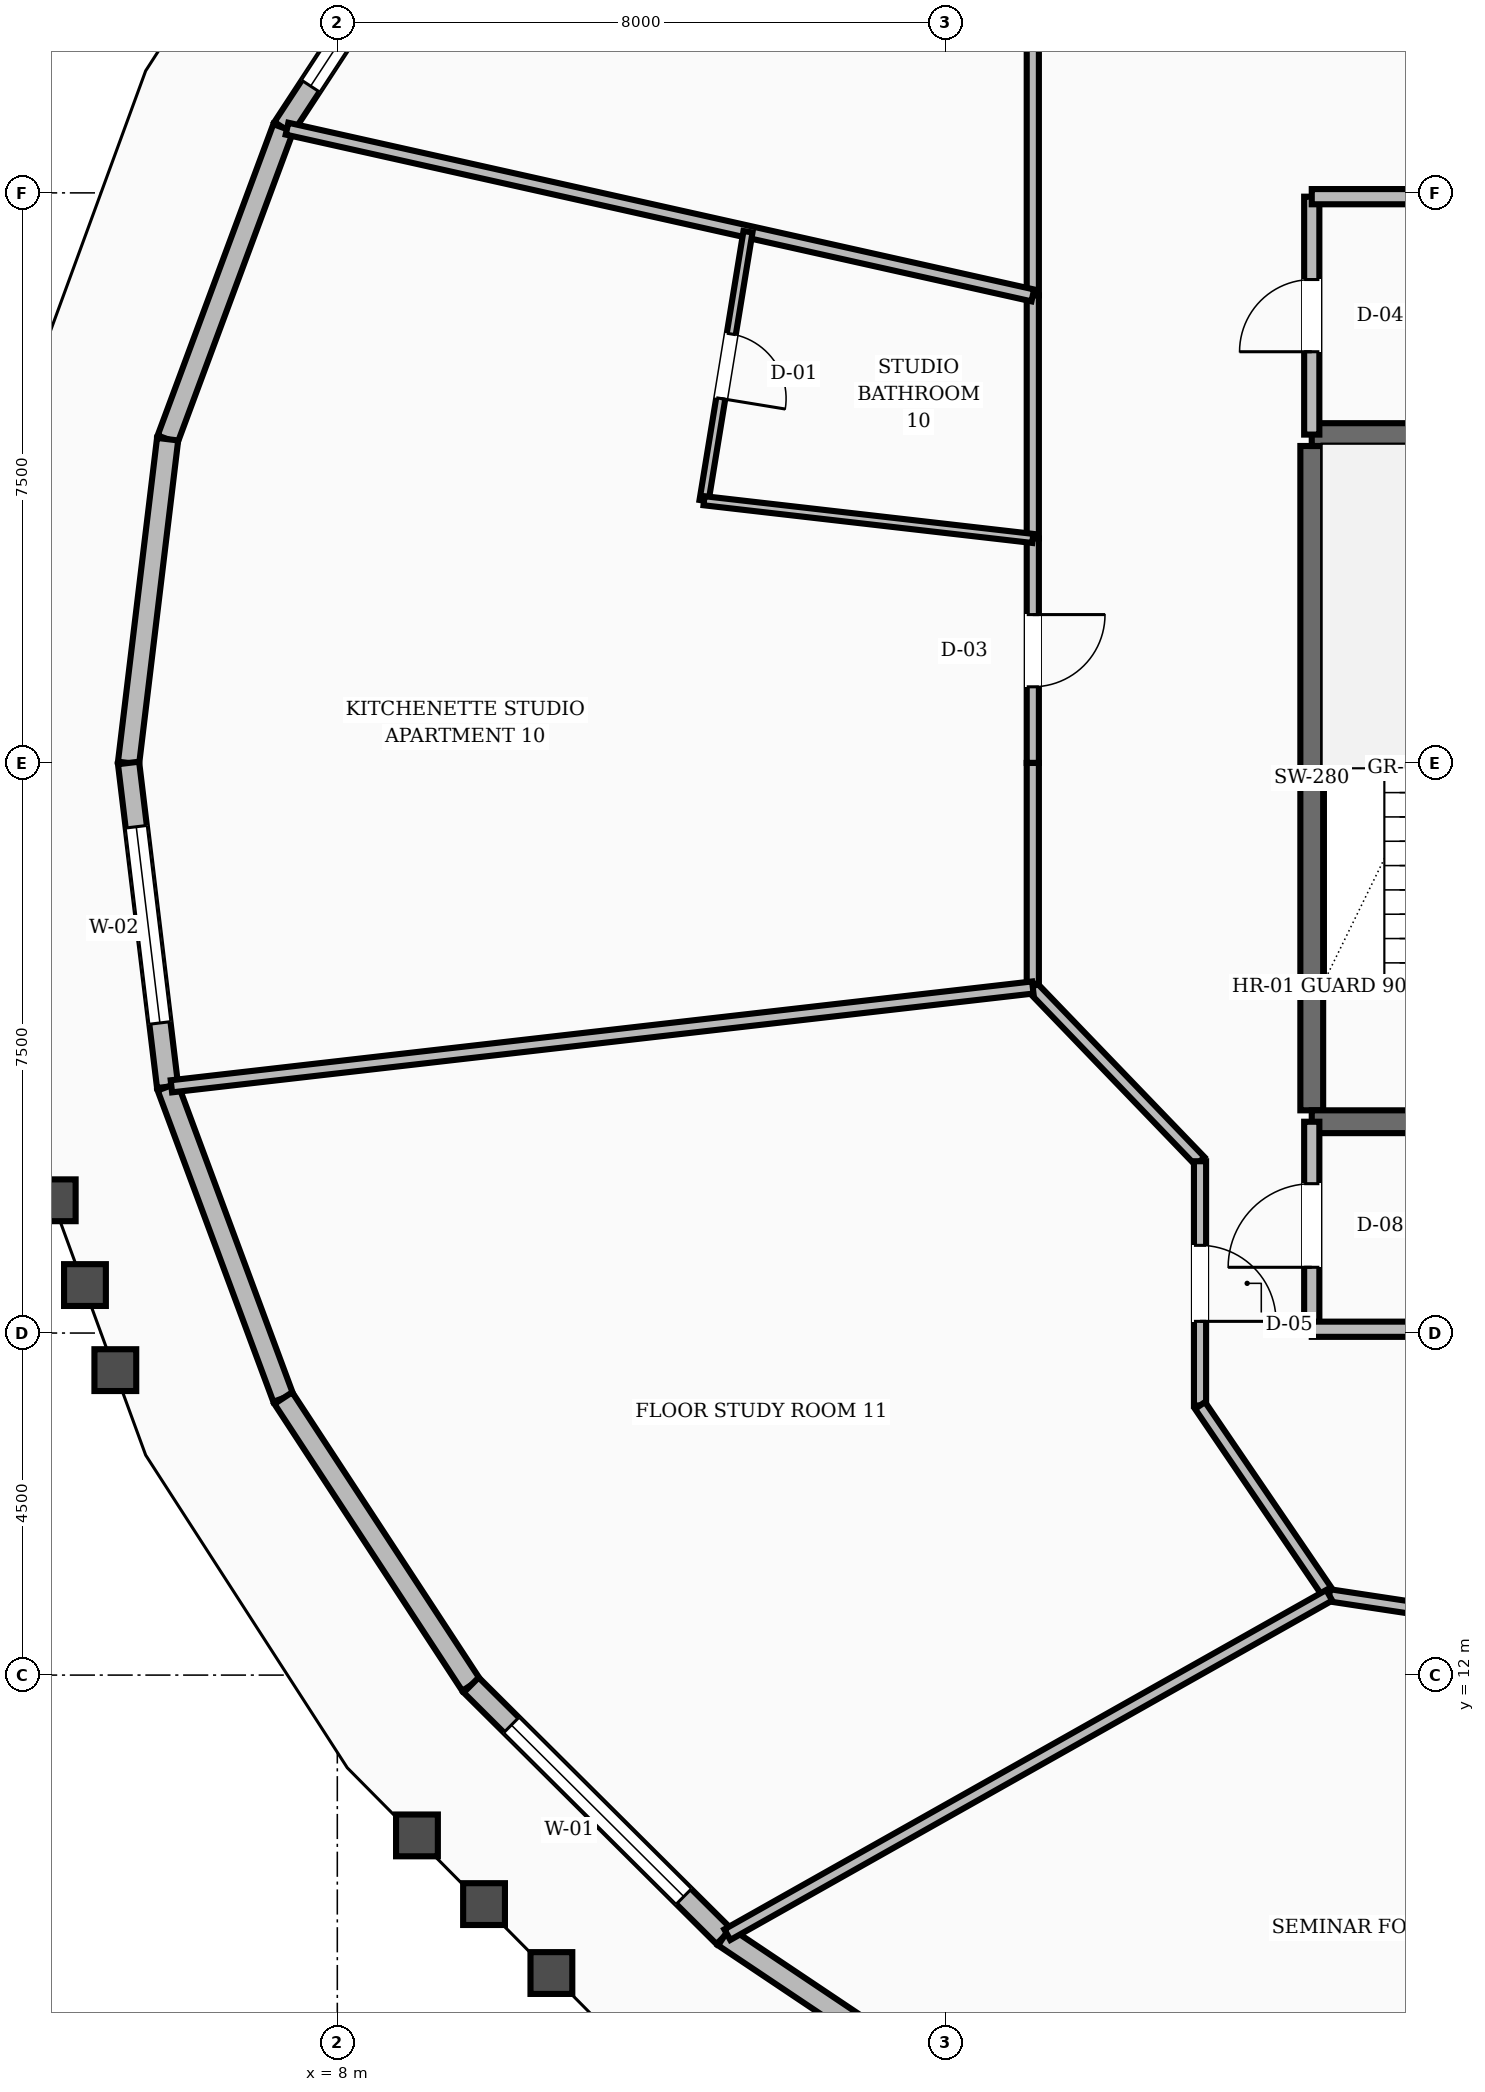
"""IFC4 building model, lengths in metres.
Left out: names, types, materials, properties, quantities, classifications, styles, units other than length and angle.
Written with IfcOpenShell. Run it as: python <this file> out.ifc"""

import sys

from ifc_helpers import new_model, si_unit, direction, frame, frame_2d, origin, place, context, subcontext, project, spatial, rectangle, extrude, element, fill, save


model = new_model("IFC4")
c1 = context("Model", 3, precision=1e-05, world=origin(), true_north=direction((0.0, 1.0)))
c2 = subcontext(c1, "Body", "Model", "MODEL_VIEW")
j1 = project(units=[si_unit("LENGTHUNIT", "METRE"), si_unit("PLANEANGLEUNIT", "RADIAN")], contexts=[c1])
p1 = place(None, origin())
s1 = spatial("IfcSite", under=j1, at=p1, CompositionType="ELEMENT")
p2 = place(p1, origin())
s2 = spatial("IfcBuilding", under=s1, at=p2, CompositionType="ELEMENT")
p3 = place(p2, frame((0.0, 0.0, 117.2)))
s3 = spatial("IfcBuildingStorey", under=s2, at=p3, CompositionType="ELEMENT", Elevation=117.2)
p4 = place(p3, frame((20.82, 19.43, 0.0), z_axis=(0.0, 0.0, 1.0), x_axis=(0.0, 1.0, 0.0)))
e1 = element("IfcWall", 1, at=p4, inside=s3, PredefinedType="SHEAR", context=c2, shape_type="SweptSolid", body=[
    extrude(rectangle(XDim=8.74, YDim=0.3, at=frame_2d((4.37, 0.0))), origin(), (0.0, 0.0, 1.0), 3.6),
])
p5 = place(p3, frame((20.82, 19.28, 0.0), z_axis=(0.0, 0.0, 1.0), x_axis=(1.0, 0.0, 0.0)))
e2 = element("IfcWall", 2, at=p5, inside=s3, PredefinedType="SHEAR", context=c2, shape_type="SweptSolid", body=[
    extrude(rectangle(XDim=3.6, YDim=0.3, at=frame_2d((1.8, 0.0))), origin(), (0.0, 0.0, 1.0), 3.6),
])
p6 = place(p5, frame((1.3, 0.0, 0.0)))
e3 = element("IfcOpeningElement", 3, at=p6, cuts=e2, PredefinedType="OPENING", context=c2, shape_type="SweptSolid", body=[
    extrude(rectangle(XDim=1.1, YDim=2.1, at=frame_2d((0.55, 1.05))), frame((0.0, 0.16, 0.0), z_axis=(0.0, -1.0, 0.0), x_axis=(1.0, 0.0, 0.0)), (0.0, 0.0, 1.0), 0.32),
])
p7 = place(p3, frame((20.82, 28.32, 0.0), z_axis=(0.0, 0.0, 1.0), x_axis=(1.0, 0.0, 0.0)))
e4 = element("IfcWall", 4, at=p7, inside=s3, PredefinedType="SHEAR", context=c2, shape_type="SweptSolid", body=[
    extrude(rectangle(XDim=3.6, YDim=0.3, at=frame_2d((1.8, 0.0))), origin(), (0.0, 0.0, 1.0), 3.6),
])
p8 = place(p3, frame((9.761, 36.131, 0.0), z_axis=(0.0, 0.0, 1.0), x_axis=(-0.547750773174, -0.836641554363, 0.0)))
e5 = element("IfcWall", 5, at=p8, inside=s3, PredefinedType="STANDARD", context=c2, shape_type="SweptSolid", body=[
    extrude(rectangle(XDim=4.512, YDim=0.28, at=frame_2d((2.256, 0.0))), origin(), (0.0, 0.0, 1.0), 2.82),
])
p9 = place(p8, frame((0.656, 0.0, 0.8)))
e6 = element("IfcOpeningElement", 6, at=p9, cuts=e5, PredefinedType="OPENING", context=c2, shape_type="SweptSolid", body=[
    extrude(rectangle(XDim=3.2, YDim=1.65, at=frame_2d((1.6, 0.825))), frame((0.0, 0.15, 0.0), z_axis=(0.0, -1.0, 0.0), x_axis=(1.0, 0.0, 0.0)), (0.0, 0.0, 1.0), 0.3),
])
p10 = place(p3, frame((7.29, 32.356, 0.0), z_axis=(0.0, 0.0, 1.0), x_axis=(-0.34836047158, -0.937360646625, 0.0)))
e7 = element("IfcWall", 7, at=p10, inside=s3, PredefinedType="STANDARD", context=c2, shape_type="SweptSolid", body=[
    extrude(rectangle(XDim=4.37, YDim=0.28, at=frame_2d((2.185, 0.0))), origin(), (0.0, 0.0, 1.0), 2.82),
])
p11 = place(p3, frame((5.767, 28.26, 0.0), z_axis=(0.0, 0.0, 1.0), x_axis=(-0.119775679937, -0.992800980306, 0.0)))
e8 = element("IfcWall", 8, at=p11, inside=s3, PredefinedType="STANDARD", context=c2, shape_type="SweptSolid", body=[
    extrude(rectangle(XDim=4.291, YDim=0.28, at=frame_2d((2.146, 0.0))), origin(), (0.0, 0.0, 1.0), 2.82),
])
p12 = place(p3, frame((5.253, 24.0, 0.0), z_axis=(0.0, 0.0, 1.0), x_axis=(0.119775679937, -0.992800980306, 0.0)))
e9 = element("IfcWall", 9, at=p12, inside=s3, PredefinedType="STANDARD", context=c2, shape_type="SweptSolid", body=[
    extrude(rectangle(XDim=4.291, YDim=0.28, at=frame_2d((2.146, 0.0))), origin(), (0.0, 0.0, 1.0), 2.82),
])
p13 = place(p12, frame((0.845, 0.0, 0.8)))
e10 = element("IfcOpeningElement", 10, at=p13, cuts=e9, PredefinedType="OPENING", context=c2, shape_type="SweptSolid", body=[
    extrude(rectangle(XDim=2.6, YDim=1.65, at=frame_2d((1.3, 0.825))), frame((0.0, 0.15, 0.0), z_axis=(0.0, -1.0, 0.0), x_axis=(1.0, 0.0, 0.0)), (0.0, 0.0, 1.0), 0.3),
])
p14 = place(p3, frame((5.767, 19.74, 0.0), z_axis=(0.0, 0.0, 1.0), x_axis=(0.34836047158, -0.937360646625, 0.0)))
e11 = element("IfcWall", 11, at=p14, inside=s3, PredefinedType="STANDARD", context=c2, shape_type="SweptSolid", body=[
    extrude(rectangle(XDim=4.37, YDim=0.28, at=frame_2d((2.185, 0.0))), origin(), (0.0, 0.0, 1.0), 2.82),
])
p15 = place(p3, frame((7.29, 15.644, 0.0), z_axis=(0.0, 0.0, 1.0), x_axis=(0.547750773174, -0.836641554363, 0.0)))
e12 = element("IfcWall", 12, at=p15, inside=s3, PredefinedType="STANDARD", context=c2, shape_type="SweptSolid", body=[
    extrude(rectangle(XDim=4.512, YDim=0.28, at=frame_2d((2.256, 0.0))), origin(), (0.0, 0.0, 1.0), 2.82),
])
p16 = place(p3, frame((9.761, 11.869, 0.0), z_axis=(0.0, 0.0, 1.0), x_axis=(0.708977561681, -0.705231038052, 0.0)))
e13 = element("IfcWall", 13, at=p16, inside=s3, PredefinedType="STANDARD", context=c2, shape_type="SweptSolid", body=[
    extrude(rectangle(XDim=4.692, YDim=0.28, at=frame_2d((2.346, 0.0))), origin(), (0.0, 0.0, 1.0), 2.82),
])
p17 = place(p16, frame((0.746, 0.0, 0.8)))
e14 = element("IfcOpeningElement", 14, at=p17, cuts=e13, PredefinedType="OPENING", context=c2, shape_type="SweptSolid", body=[
    extrude(rectangle(XDim=3.2, YDim=1.65, at=frame_2d((1.6, 0.825))), frame((0.0, 0.15, 0.0), z_axis=(0.0, -1.0, 0.0), x_axis=(1.0, 0.0, 0.0)), (0.0, 0.0, 1.0), 0.3),
])
p18 = place(p3, frame((13.087, 8.561, 0.0), z_axis=(0.0, 0.0, 1.0), x_axis=(0.830785482437, -0.556592743549, 0.0)))
e15 = element("IfcWall", 15, at=p18, inside=s3, PredefinedType="STANDARD", context=c2, shape_type="SweptSolid", body=[
    extrude(rectangle(XDim=4.878, YDim=0.28, at=frame_2d((2.439, 0.0))), origin(), (0.0, 0.0, 1.0), 2.82),
])
p19 = place(p3, frame((20.82, 16.55, 0.0), z_axis=(0.0, 0.0, 1.0), x_axis=(0.0, 1.0, 0.0)))
e16 = element("IfcWall", 16, at=p19, inside=s3, PredefinedType="SOLIDWALL", context=c2, shape_type="SweptSolid", body=[
    extrude(rectangle(XDim=2.73, YDim=0.2, at=frame_2d((1.365, 0.0))), origin(), (0.0, 0.0, 1.0), 2.8),
])
p20 = place(p19, frame((0.815, 0.0, 0.0)))
e17 = element("IfcOpeningElement", 17, at=p20, cuts=e16, PredefinedType="OPENING", context=c2, shape_type="SweptSolid", body=[
    extrude(rectangle(XDim=1.1, YDim=2.1, at=frame_2d((0.55, 1.05))), frame((0.0, 0.11, 0.0), z_axis=(0.0, -1.0, 0.0), x_axis=(1.0, 0.0, 0.0)), (0.0, 0.0, 1.0), 0.22),
])
p21 = place(p3, frame((20.82, 16.55, 0.0), z_axis=(0.0, 0.0, 1.0), x_axis=(1.0, 0.0, 0.0)))
e18 = element("IfcWall", 18, at=p21, inside=s3, PredefinedType="SOLIDWALL", context=c2, shape_type="SweptSolid", body=[
    extrude(rectangle(XDim=3.98, YDim=0.2, at=frame_2d((1.99, 0.0))), origin(), (0.0, 0.0, 1.0), 2.8),
])
p22 = place(p3, frame((20.82, 28.32, 0.0), z_axis=(0.0, 0.0, 1.0), x_axis=(0.0, 1.0, 0.0)))
e19 = element("IfcWall", 19, at=p22, inside=s3, PredefinedType="SOLIDWALL", context=c2, shape_type="SweptSolid", body=[
    extrude(rectangle(XDim=3.13, YDim=0.2, at=frame_2d((1.565, 0.0))), origin(), (0.0, 0.0, 1.0), 2.8),
])
p23 = place(p22, frame((1.09, 0.0, 0.0)))
e20 = element("IfcOpeningElement", 20, at=p23, cuts=e19, PredefinedType="OPENING", context=c2, shape_type="SweptSolid", body=[
    extrude(rectangle(XDim=0.95, YDim=2.1, at=frame_2d((0.475, 1.05))), frame((0.0, 0.11, 0.0), z_axis=(0.0, -1.0, 0.0), x_axis=(1.0, 0.0, 0.0)), (0.0, 0.0, 1.0), 0.22),
])
p24 = place(p3, frame((20.82, 31.45, 0.0), z_axis=(0.0, 0.0, 1.0), x_axis=(1.0, 0.0, 0.0)))
e21 = element("IfcWall", 21, at=p24, inside=s3, PredefinedType="SOLIDWALL", context=c2, shape_type="SweptSolid", body=[
    extrude(rectangle(XDim=3.98, YDim=0.2, at=frame_2d((1.99, 0.0))), origin(), (0.0, 0.0, 1.0), 2.8),
])
p25 = place(p3, frame((17.15, 33.923, 0.0), z_axis=(0.0, 0.0, 1.0), x_axis=(0.0, -1.0, 0.0)))
e22 = element("IfcWall", 22, at=p25, inside=s3, PredefinedType="SOLIDWALL", context=c2, shape_type="SweptSolid", body=[
    extrude(rectangle(XDim=3.771, YDim=0.16, at=frame_2d((1.886, 0.0))), origin(), (0.0, 0.0, 1.0), 2.8),
])
p26 = place(p3, frame((17.15, 30.151, 0.0), z_axis=(0.0, 0.0, 1.0), x_axis=(0.0, -1.0, 0.0)))
e23 = element("IfcWall", 23, at=p26, inside=s3, PredefinedType="SOLIDWALL", context=c2, shape_type="SweptSolid", body=[
    extrude(rectangle(XDim=3.197, YDim=0.16, at=frame_2d((1.599, 0.0))), origin(), (0.0, 0.0, 1.0), 2.8),
])
p27 = place(p3, frame((17.15, 26.954, 0.0), z_axis=(0.0, 0.0, 1.0), x_axis=(0.0, -1.0, 0.0)))
e24 = element("IfcWall", 24, at=p27, inside=s3, PredefinedType="SOLIDWALL", context=c2, shape_type="SweptSolid", body=[
    extrude(rectangle(XDim=2.954, YDim=0.16, at=frame_2d((1.477, 0.0))), origin(), (0.0, 0.0, 1.0), 2.8),
])
p28 = place(p27, frame((1.002, 0.0, 0.0)))
e25 = element("IfcOpeningElement", 25, at=p28, cuts=e24, PredefinedType="OPENING", context=c2, shape_type="SweptSolid", body=[
    extrude(rectangle(XDim=0.95, YDim=2.1, at=frame_2d((0.475, 1.05))), frame((0.0, 0.09, 0.0), z_axis=(0.0, -1.0, 0.0), x_axis=(1.0, 0.0, 0.0)), (0.0, 0.0, 1.0), 0.18),
])
p29 = place(p3, frame((17.15, 24.0, 0.0), z_axis=(0.0, 0.0, 1.0), x_axis=(0.0, -1.0, 0.0)))
e26 = element("IfcWall", 26, at=p29, inside=s3, PredefinedType="SOLIDWALL", context=c2, shape_type="SweptSolid", body=[
    extrude(rectangle(XDim=2.954, YDim=0.16, at=frame_2d((1.477, 0.0))), origin(), (0.0, 0.0, 1.0), 2.8),
])
p30 = place(p3, frame((17.15, 21.046, 0.0), z_axis=(0.0, 0.0, 1.0), x_axis=(0.693473090138, -0.72048252807, 0.0)))
e27 = element("IfcWall", 27, at=p30, inside=s3, PredefinedType="SOLIDWALL", context=c2, shape_type="SweptSolid", body=[
    extrude(rectangle(XDim=3.173, YDim=0.16, at=frame_2d((1.586, 0.0))), origin(), (0.0, 0.0, 1.0), 2.8),
])
p31 = place(p3, frame((19.35, 18.76, 0.0), z_axis=(0.0, 0.0, 1.0), x_axis=(0.0, -1.0, 0.0)))
e28 = element("IfcWall", 28, at=p31, inside=s3, PredefinedType="SOLIDWALL", context=c2, shape_type="SweptSolid", body=[
    extrude(rectangle(XDim=3.213, YDim=0.16, at=frame_2d((1.606, 0.0))), origin(), (0.0, 0.0, 1.0), 2.8),
])
p32 = place(p31, frame((1.106, 0.0, 0.0)))
e29 = element("IfcOpeningElement", 29, at=p32, cuts=e28, PredefinedType="OPENING", context=c2, shape_type="SweptSolid", body=[
    extrude(rectangle(XDim=1.0, YDim=2.1, at=frame_2d((0.5, 1.05))), frame((0.0, 0.09, 0.0), z_axis=(0.0, -1.0, 0.0), x_axis=(1.0, 0.0, 0.0)), (0.0, 0.0, 1.0), 0.18),
])
p33 = place(p3, frame((19.35, 15.548, 0.0), z_axis=(0.0, 0.0, 1.0), x_axis=(0.562674669208, -0.826678423955, 0.0)))
e30 = element("IfcWall", 30, at=p33, inside=s3, PredefinedType="SOLIDWALL", context=c2, shape_type="SweptSolid", body=[
    extrude(rectangle(XDim=3.021, YDim=0.16, at=frame_2d((1.511, 0.0))), origin(), (0.0, 0.0, 1.0), 2.8),
])
p34 = place(p3, frame((21.05, 13.05, 0.0), z_axis=(0.0, 0.0, 1.0), x_axis=(0.988710906508, -0.149835721217, 0.0)))
e31 = element("IfcWall", 31, at=p34, inside=s3, PredefinedType="SOLIDWALL", context=c2, shape_type="SweptSolid", body=[
    extrude(rectangle(XDim=3.337, YDim=0.16, at=frame_2d((1.668, 0.0))), origin(), (0.0, 0.0, 1.0), 2.8),
])
p35 = place(p3, frame((17.15, 30.151, 0.0), z_axis=(0.0, 0.0, 1.0), x_axis=(-0.975906846943, 0.218187593804, 0.0)))
e32 = element("IfcWall", 32, at=p35, inside=s3, PredefinedType="SOLIDWALL", context=c2, shape_type="SweptSolid", body=[
    extrude(rectangle(XDim=10.054, YDim=0.16, at=frame_2d((5.027, 0.0))), origin(), (0.0, 0.0, 1.0), 2.8),
])
p36 = place(p3, frame((13.403, 30.989, 0.0), z_axis=(0.0, 0.0, 1.0), x_axis=(-0.161295662085, -0.98690612998, 0.0)))
e33 = element("IfcWall", 33, at=p36, inside=s3, PredefinedType="PARTITIONING", context=c2, shape_type="SweptSolid", body=[
    extrude(rectangle(XDim=3.586, YDim=0.12, at=frame_2d((1.793, 0.0))), origin(), (0.0, 0.0, 1.0), 2.8),
])
p37 = place(p36, frame((1.363, 0.0, 0.0)))
e34 = element("IfcOpeningElement", 34, at=p37, cuts=e33, PredefinedType="OPENING", context=c2, shape_type="SweptSolid", body=[
    extrude(rectangle(XDim=0.86, YDim=2.1, at=frame_2d((0.43, 1.05))), frame((0.0, 0.07, 0.0), z_axis=(0.0, -1.0, 0.0), x_axis=(1.0, 0.0, 0.0)), (0.0, 0.0, 1.0), 0.14),
])
p38 = place(p3, frame((17.15, 26.954, 0.0), z_axis=(0.0, 0.0, 1.0), x_axis=(-0.993486317504, 0.11395146744, 0.0)))
e35 = element("IfcWall", 35, at=p38, inside=s3, PredefinedType="PARTITIONING", context=c2, shape_type="SweptSolid", body=[
    extrude(rectangle(XDim=4.354, YDim=0.12, at=frame_2d((2.177, 0.0))), origin(), (0.0, 0.0, 1.0), 2.8),
])
p39 = place(p3, frame((17.15, 21.046, 0.0), z_axis=(0.0, 0.0, 1.0), x_axis=(-0.993484362684, -0.113968509259, 0.0)))
e36 = element("IfcWall", 36, at=p39, inside=s3, PredefinedType="SOLIDWALL", context=c2, shape_type="SweptSolid", body=[
    extrude(rectangle(XDim=11.407, YDim=0.16, at=frame_2d((5.704, 0.0))), origin(), (0.0, 0.0, 1.0), 2.8),
])
p40 = place(p3, frame((21.05, 13.05, 0.0), z_axis=(0.0, 0.0, 1.0), x_axis=(-0.871084529958, -0.491133120109, 0.0)))
e37 = element("IfcWall", 37, at=p40, inside=s3, PredefinedType="SOLIDWALL", context=c2, shape_type="SweptSolid", body=[
    extrude(rectangle(XDim=9.091, YDim=0.16, at=frame_2d((4.545, 0.0))), origin(), (0.0, 0.0, 1.0), 2.8),
])
p41 = place(p9, origin())
e38 = element("IfcWindow", 38, at=p41, inside=s3, PartitioningType="SINGLE_PANEL", PredefinedType="WINDOW", context=c2, shape_type="SweptSolid", body=[
    extrude(rectangle(XDim=3.2, YDim=1.65, at=frame_2d((1.6, 0.825))), frame((0.0, 0.03, 0.0), z_axis=(0.0, -1.0, 0.0), x_axis=(1.0, 0.0, 0.0)), (0.0, 0.0, 1.0), 0.06),
])
fill(e6, e38)
p42 = place(p13, origin())
e39 = element("IfcWindow", 39, at=p42, inside=s3, PartitioningType="SINGLE_PANEL", PredefinedType="WINDOW", context=c2, shape_type="SweptSolid", body=[
    extrude(rectangle(XDim=2.6, YDim=1.65, at=frame_2d((1.3, 0.825))), frame((0.0, 0.03, 0.0), z_axis=(0.0, -1.0, 0.0), x_axis=(1.0, 0.0, 0.0)), (0.0, 0.0, 1.0), 0.06),
])
fill(e10, e39)
p43 = place(p17, origin())
e40 = element("IfcWindow", 40, at=p43, inside=s3, PartitioningType="SINGLE_PANEL", PredefinedType="WINDOW", context=c2, shape_type="SweptSolid", body=[
    extrude(rectangle(XDim=3.2, YDim=1.65, at=frame_2d((1.6, 0.825))), frame((0.0, 0.03, 0.0), z_axis=(0.0, -1.0, 0.0), x_axis=(1.0, 0.0, 0.0)), (0.0, 0.0, 1.0), 0.06),
])
fill(e14, e40)
p44 = place(p20, origin())
e41 = element("IfcDoor", 41, at=p44, inside=s3, OperationType="SINGLE_SWING_LEFT", PredefinedType="DOOR", context=c2, shape_type="SweptSolid", body=[
    extrude(rectangle(XDim=1.1, YDim=2.1, at=frame_2d((0.55, 1.05))), frame((0.0, 0.025, 0.0), z_axis=(0.0, -1.0, 0.0), x_axis=(1.0, 0.0, 0.0)), (0.0, 0.0, 1.0), 0.05),
])
fill(e17, e41)
p45 = place(p23, origin())
e42 = element("IfcDoor", 42, at=p45, inside=s3, OperationType="SINGLE_SWING_LEFT", PredefinedType="DOOR", context=c2, shape_type="SweptSolid", body=[
    extrude(rectangle(XDim=0.95, YDim=2.1, at=frame_2d((0.475, 1.05))), frame((0.0, 0.025, 0.0), z_axis=(0.0, -1.0, 0.0), x_axis=(1.0, 0.0, 0.0)), (0.0, 0.0, 1.0), 0.05),
])
fill(e20, e42)
p46 = place(p37, origin())
e43 = element("IfcDoor", 43, at=p46, inside=s3, OperationType="SINGLE_SWING_RIGHT", PredefinedType="DOOR", context=c2, shape_type="SweptSolid", body=[
    extrude(rectangle(XDim=0.86, YDim=2.1, at=frame_2d((0.43, 1.05))), frame((0.0, 0.025, 0.0), z_axis=(0.0, -1.0, 0.0), x_axis=(1.0, 0.0, 0.0)), (0.0, 0.0, 1.0), 0.05),
])
fill(e34, e43)
p47 = place(p28, origin())
e44 = element("IfcDoor", 44, at=p47, inside=s3, OperationType="SINGLE_SWING_LEFT", PredefinedType="DOOR", context=c2, shape_type="SweptSolid", body=[
    extrude(rectangle(XDim=0.95, YDim=2.1, at=frame_2d((0.475, 1.05))), frame((0.0, 0.025, 0.0), z_axis=(0.0, -1.0, 0.0), x_axis=(1.0, 0.0, 0.0)), (0.0, 0.0, 1.0), 0.05),
])
fill(e25, e44)
p48 = place(p32, origin())
e45 = element("IfcDoor", 45, at=p48, inside=s3, OperationType="SINGLE_SWING_RIGHT", PredefinedType="DOOR", context=c2, shape_type="SweptSolid", body=[
    extrude(rectangle(XDim=1.0, YDim=2.1, at=frame_2d((0.5, 1.05))), frame((0.0, 0.025, 0.0), z_axis=(0.0, -1.0, 0.0), x_axis=(1.0, 0.0, 0.0)), (0.0, 0.0, 1.0), 0.05),
])
fill(e29, e45)
save(model, sys.argv[1])
